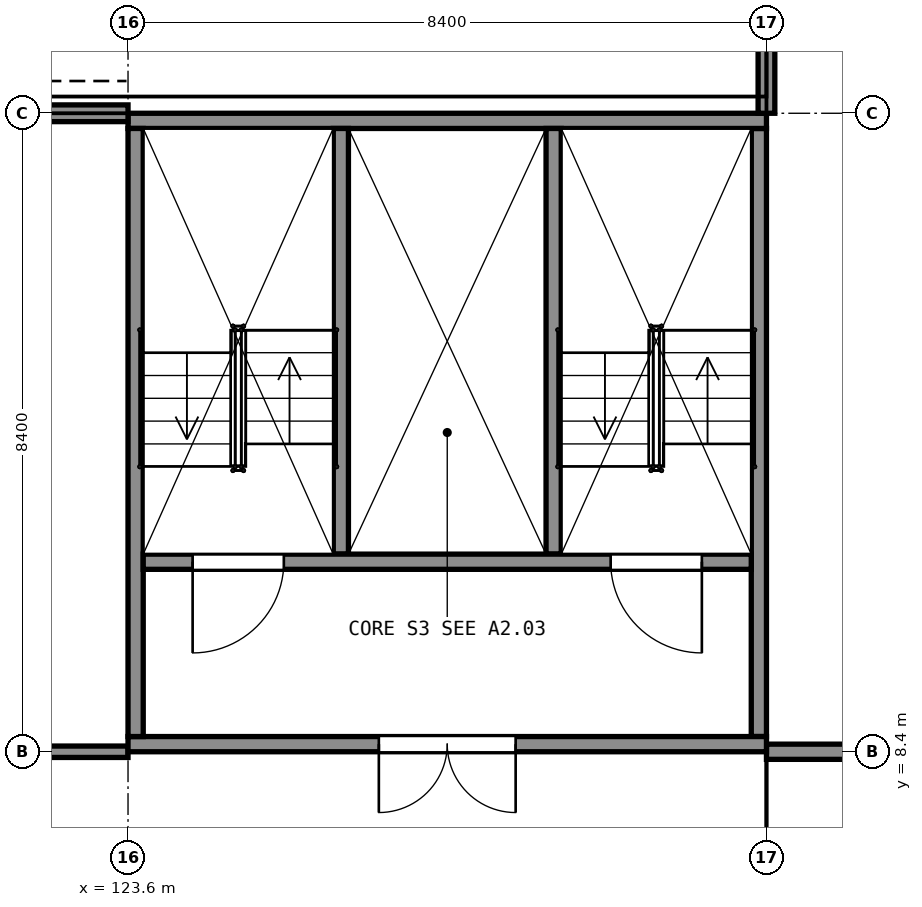
"""IFC4 building model, lengths in metres.
Left out: names, types, materials, properties, quantities, classifications, styles, units other than length and angle.
Written with IfcOpenShell. Run it as: python <this file> out.ifc"""

import sys

from ifc_helpers import new_model, si_unit, direction, frame, frame_2d, origin, place, context, subcontext, project, spatial, rectangle, extrude, element, fill, save


model = new_model("IFC4")
c1 = context("Model", 3, precision=1e-05, world=origin(), true_north=direction((0.0, 1.0)))
c2 = subcontext(c1, "Body", "Model", "MODEL_VIEW")
j1 = project(units=[si_unit("LENGTHUNIT", "METRE"), si_unit("PLANEANGLEUNIT", "RADIAN")], contexts=[c1])
p1 = place(None, origin())
s1 = spatial("IfcSite", under=j1, at=p1, CompositionType="ELEMENT")
p2 = place(p1, origin())
s2 = spatial("IfcBuilding", under=s1, at=p2, CompositionType="ELEMENT")
p3 = place(p2, frame((0.0, 0.0, 5.5)))
s3 = spatial("IfcBuildingStorey", under=s2, at=p3, CompositionType="ELEMENT", Elevation=5.5)
p4 = place(p3, frame((123.6, 8.5, 0.0), z_axis=(0.0, 0.0, 1.0), x_axis=(1.0, 0.0, 0.0)))
e1 = element("IfcWall", 1, at=p4, inside=s3, PredefinedType="SHEAR", context=c2, shape_type="SweptSolid", body=[
    extrude(rectangle(XDim=8.4, YDim=0.2, at=frame_2d((4.2, 0.0))), origin(), (0.0, 0.0, 1.0), 5.0),
])
p5 = place(p4, frame((3.3, 0.0, 0.0)))
e2 = element("IfcOpeningElement", 2, at=p5, cuts=e1, PredefinedType="OPENING", context=c2, shape_type="SweptSolid", body=[
    extrude(rectangle(XDim=1.8, YDim=2.1, at=frame_2d((0.9, 1.05))), frame((0.0, 0.11, 0.0), z_axis=(0.0, -1.0, 0.0), x_axis=(1.0, 0.0, 0.0)), (0.0, 0.0, 1.0), 0.22),
])
p6 = place(p3, frame((123.6, 16.7, 0.0), z_axis=(0.0, 0.0, 1.0), x_axis=(1.0, 0.0, 0.0)))
e3 = element("IfcWall", 3, at=p6, inside=s3, PredefinedType="SHEAR", context=c2, shape_type="SweptSolid", body=[
    extrude(rectangle(XDim=8.4, YDim=0.2, at=frame_2d((4.2, 0.0))), origin(), (0.0, 0.0, 1.0), 5.0),
])
for number, where, z_axis, x_axis in (
    (4, (123.7, 8.6, 0.0), (0.0, 0.0, 1.0), (0.0, 1.0, 0.0)),
    (5, (131.9, 8.6, 0.0), (0.0, 0.0, 1.0), (0.0, 1.0, 0.0)),
):
    element("IfcWall", number, at=place(p3, frame(where, z_axis=z_axis, x_axis=x_axis)), inside=s3, PredefinedType="SHEAR", context=c2, shape_type="SweptSolid", body=[
        extrude(rectangle(XDim=8.0, YDim=0.2, at=frame_2d((4.0, 0.0))), origin(), (0.0, 0.0, 1.0), 5.0),
    ])
p7 = place(p3, frame((123.8, 10.9, 0.0), z_axis=(0.0, 0.0, 1.0), x_axis=(1.0, 0.0, 0.0)))
e6 = element("IfcWall", 6, at=p7, inside=s3, PredefinedType="SHEAR", context=c2, shape_type="SweptSolid", body=[
    extrude(rectangle(XDim=8.0, YDim=0.2, at=frame_2d((4.0, 0.0))), origin(), (0.0, 0.0, 1.0), 5.0),
])
p8 = place(p7, frame((0.65, 0.0, 0.0)))
e7 = element("IfcOpeningElement", 7, at=p8, cuts=e6, PredefinedType="OPENING", context=c2, shape_type="SweptSolid", body=[
    extrude(rectangle(XDim=1.2, YDim=2.1, at=frame_2d((0.6, 1.05))), frame((0.0, 0.11, 0.0), z_axis=(0.0, -1.0, 0.0), x_axis=(1.0, 0.0, 0.0)), (0.0, 0.0, 1.0), 0.22),
])
p9 = place(p7, frame((6.15, 0.0, 0.0)))
e8 = element("IfcOpeningElement", 8, at=p9, cuts=e6, PredefinedType="OPENING", context=c2, shape_type="SweptSolid", body=[
    extrude(rectangle(XDim=1.2, YDim=2.1, at=frame_2d((0.6, 1.05))), frame((0.0, 0.11, 0.0), z_axis=(0.0, -1.0, 0.0), x_axis=(1.0, 0.0, 0.0)), (0.0, 0.0, 1.0), 0.22),
])
for number, where, z_axis, x_axis in (
    (9, (126.4, 11.0, 0.0), (0.0, 0.0, 1.0), (0.0, 1.0, 0.0)),
    (10, (129.2, 11.0, 0.0), (0.0, 0.0, 1.0), (0.0, 1.0, 0.0)),
):
    element("IfcWall", number, at=place(p3, frame(where, z_axis=z_axis, x_axis=x_axis)), inside=s3, PredefinedType="SHEAR", context=c2, shape_type="SweptSolid", body=[
        extrude(rectangle(XDim=5.6, YDim=0.2, at=frame_2d((2.8, 0.0))), origin(), (0.0, 0.0, 1.0), 5.0),
    ])
p10 = place(p3, frame((132.0, 16.8, 0.0), z_axis=(0.0, 0.0, 1.0), x_axis=(0.0, 1.0, 0.0)))
e11 = element("IfcWall", 11, at=p10, inside=s3, PredefinedType="SOLIDWALL", context=c2, shape_type="SweptSolid", body=[
    extrude(rectangle(XDim=8.0, YDim=0.22, at=frame_2d((4.0, 0.0))), origin(), (0.0, 0.0, 1.0), 3.94),
])
p11 = place(p10, frame((2.2, 0.0, 0.9)))
e12 = element("IfcOpeningElement", 12, at=p11, cuts=e11, PredefinedType="OPENING", context=c2, shape_type="SweptSolid", body=[
    extrude(rectangle(XDim=3.6, YDim=1.5, at=frame_2d((1.8, 0.75))), frame((0.0, 0.12, 0.0), z_axis=(0.0, -1.0, 0.0), x_axis=(1.0, 0.0, 0.0)), (0.0, 0.0, 1.0), 0.24),
])
p12 = place(p3, frame((115.6, 16.8, 0.0), z_axis=(0.0, 0.0, 1.0), x_axis=(1.0, 0.0, 0.0)))
e13 = element("IfcWall", 13, at=p12, inside=s3, PredefinedType="SOLIDWALL", context=c2, shape_type="SweptSolid", body=[
    extrude(rectangle(XDim=8.0, YDim=0.22, at=frame_2d((4.0, 0.0))), origin(), (0.0, 0.0, 1.0), 3.94),
])
p13 = place(p12, frame((2.2, 0.0, 0.9)))
e14 = element("IfcOpeningElement", 14, at=p13, cuts=e13, PredefinedType="OPENING", context=c2, shape_type="SweptSolid", body=[
    extrude(rectangle(XDim=3.6, YDim=1.5, at=frame_2d((1.8, 0.75))), frame((0.0, 0.12, 0.0), z_axis=(0.0, -1.0, 0.0), x_axis=(1.0, 0.0, 0.0)), (0.0, 0.0, 1.0), 0.24),
])
p14 = place(p3, frame((132.0, 8.4, 0.0), z_axis=(0.0, 0.0, 1.0), x_axis=(1.0, 0.0, 0.0)))
e15 = element("IfcWall", 15, at=p14, inside=s3, PredefinedType="PARTITIONING", context=c2, shape_type="SweptSolid", body=[
    extrude(rectangle(XDim=8.0, YDim=0.2, at=frame_2d((4.0, 0.0))), origin(), (0.0, 0.0, 1.0), 3.9),
])
p15 = place(p3, frame((115.6, 8.4, 0.0), z_axis=(0.0, 0.0, 1.0), x_axis=(1.0, 0.0, 0.0)))
e16 = element("IfcWall", 16, at=p15, inside=s3, PredefinedType="PARTITIONING", context=c2, shape_type="SweptSolid", body=[
    extrude(rectangle(XDim=8.0, YDim=0.15, at=frame_2d((4.0, 0.0))), origin(), (0.0, 0.0, 1.0), 3.9),
])
p16 = place(p15, frame((4.875, 0.0, 0.0)))
e17 = element("IfcOpeningElement", 17, at=p16, cuts=e16, PredefinedType="OPENING", context=c2, shape_type="SweptSolid", body=[
    extrude(rectangle(XDim=1.8, YDim=2.1, at=frame_2d((0.9, 1.05))), frame((0.0, 0.085, 0.0), z_axis=(0.0, -1.0, 0.0), x_axis=(1.0, 0.0, 0.0)), (0.0, 0.0, 1.0), 0.17),
])
p17 = place(p5, origin())
e18 = element("IfcDoor", 18, at=p17, inside=s3, OperationType="DOUBLE_DOOR_SINGLE_SWING", PredefinedType="DOOR", context=c2, shape_type="SweptSolid", body=[
    extrude(rectangle(XDim=1.8, YDim=2.1, at=frame_2d((0.9, 1.05))), frame((0.0, 0.025, 0.0), z_axis=(0.0, -1.0, 0.0), x_axis=(1.0, 0.0, 0.0)), (0.0, 0.0, 1.0), 0.05),
])
fill(e2, e18)
p18 = place(p8, origin())
e19 = element("IfcDoor", 19, at=p18, inside=s3, OperationType="SINGLE_SWING_LEFT", PredefinedType="DOOR", context=c2, shape_type="SweptSolid", body=[
    extrude(rectangle(XDim=1.2, YDim=2.1, at=frame_2d((0.6, 1.05))), frame((0.0, 0.025, 0.0), z_axis=(0.0, -1.0, 0.0), x_axis=(1.0, 0.0, 0.0)), (0.0, 0.0, 1.0), 0.05),
])
fill(e7, e19)
p19 = place(p9, origin())
e20 = element("IfcDoor", 20, at=p19, inside=s3, OperationType="SINGLE_SWING_RIGHT", PredefinedType="DOOR", context=c2, shape_type="SweptSolid", body=[
    extrude(rectangle(XDim=1.2, YDim=2.1, at=frame_2d((0.6, 1.05))), frame((0.0, 0.025, 0.0), z_axis=(0.0, -1.0, 0.0), x_axis=(1.0, 0.0, 0.0)), (0.0, 0.0, 1.0), 0.05),
])
fill(e8, e20)
save(model, sys.argv[1])
